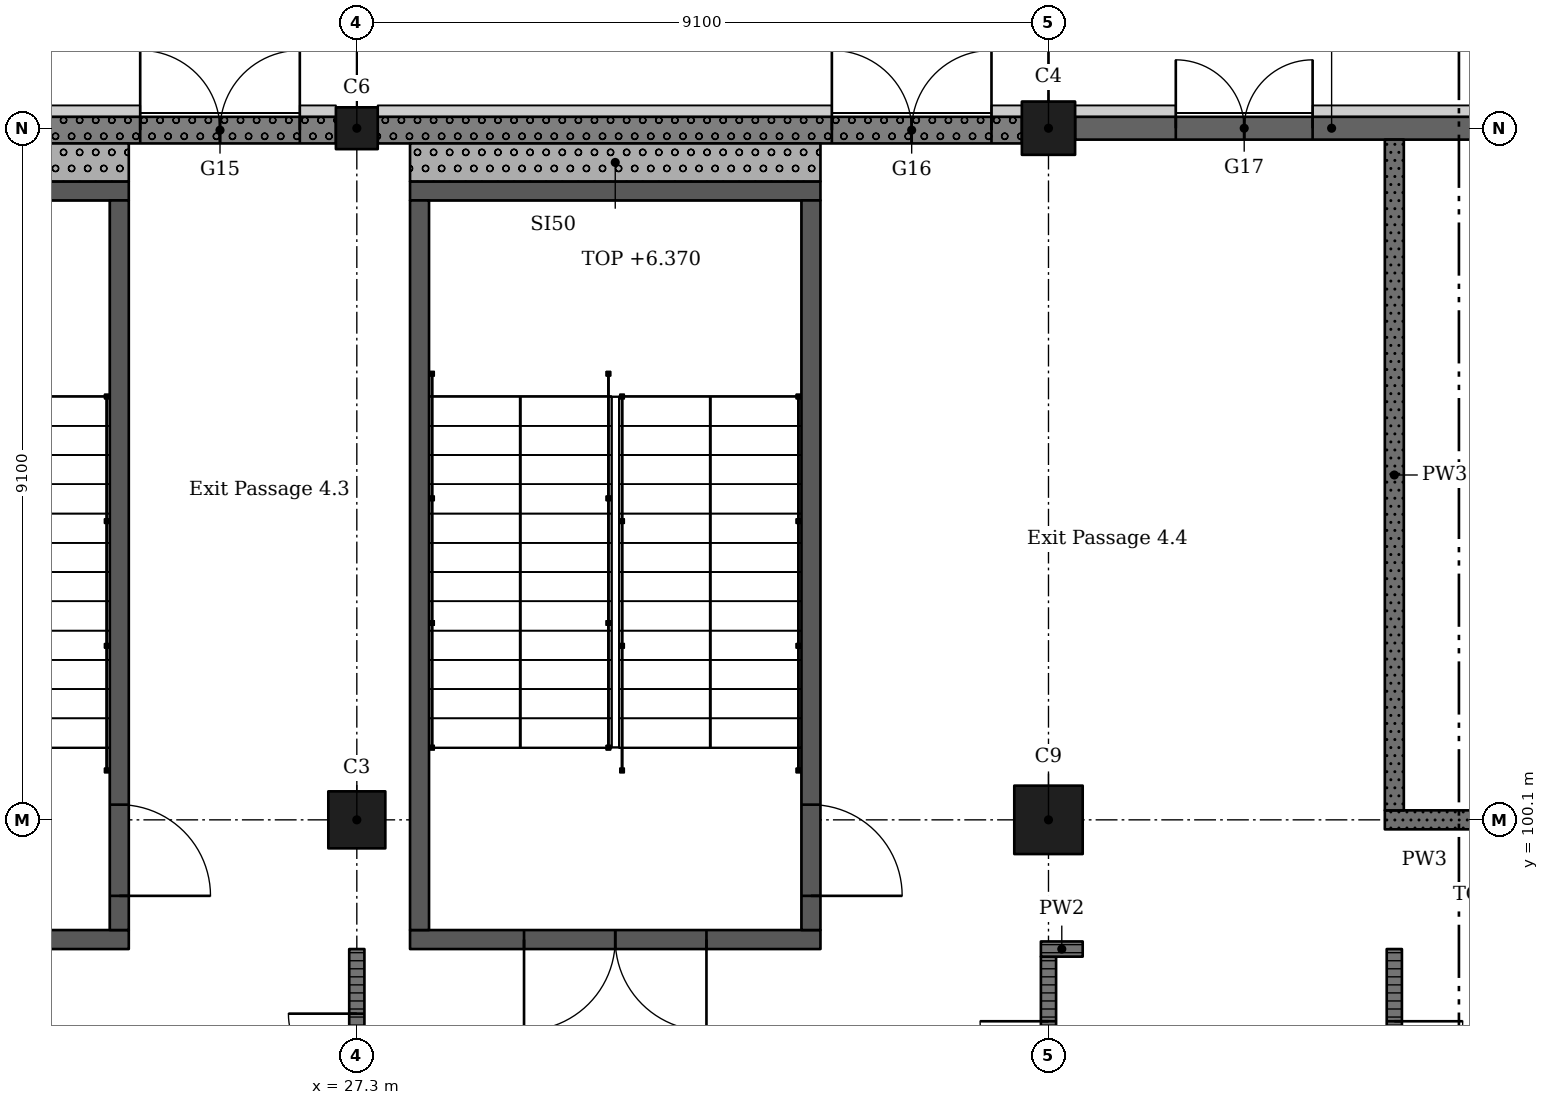
"""IFC4 building model, lengths in metres.
Left out: names, types, materials, properties, quantities, classifications, styles, units other than length and angle.
Written with IfcOpenShell. Run it as: python <this file> out.ifc"""

import sys

from ifc_helpers import new_model, si_unit, direction, frame, frame_2d, origin, origin_2d, place, context, subcontext, project, spatial, rectangle, extrude, element, fill, save


model = new_model("IFC4")
c1 = context("Model", 3, precision=1e-05, world=origin(), true_north=direction((0.0, 1.0)))
c2 = subcontext(c1, "Body", "Model", "MODEL_VIEW")
j1 = project(units=[si_unit("LENGTHUNIT", "METRE"), si_unit("PLANEANGLEUNIT", "RADIAN")], contexts=[c1])
p1 = place(None, origin())
s1 = spatial("IfcSite", under=j1, at=p1, CompositionType="ELEMENT")
p2 = place(p1, origin())
s2 = spatial("IfcBuilding", under=s1, at=p2, CompositionType="ELEMENT")
p3 = place(p2, origin())
s3 = spatial("IfcBuildingStorey", under=s2, at=p3, CompositionType="ELEMENT", Elevation=0.0)
p4 = place(p3, frame((27.3, 100.1, -0.4), z_axis=(0.0, 0.0, 1.0), x_axis=(1.0, 0.0, 0.0)))
e1 = element("IfcColumn", 1, at=p4, inside=s3, PredefinedType="COLUMN", context=c2, shape_type="SweptSolid", body=[
    extrude(rectangle(XDim=0.75, YDim=0.75, at=origin_2d()), origin(), (0.0, 0.0, 1.0), 6.77),
])
p5 = place(p3, frame((27.3, 109.2, -0.4), z_axis=(0.0, 0.0, 1.0), x_axis=(1.0, 0.0, 0.0)))
e2 = element("IfcColumn", 2, at=p5, inside=s3, PredefinedType="COLUMN", context=c2, shape_type="SweptSolid", body=[
    extrude(rectangle(XDim=0.55, YDim=0.55, at=origin_2d()), origin(), (0.0, 0.0, 1.0), 6.77),
])
p6 = place(p3, frame((36.4, 100.1, -0.4), z_axis=(0.0, 0.0, 1.0), x_axis=(1.0, 0.0, 0.0)))
e3 = element("IfcColumn", 3, at=p6, inside=s3, PredefinedType="COLUMN", context=c2, shape_type="SweptSolid", body=[
    extrude(rectangle(XDim=0.9, YDim=0.9, at=origin_2d()), origin(), (0.0, 0.0, 1.0), 6.77),
])
p7 = place(p3, frame((36.4, 109.2, -0.4), z_axis=(0.0, 0.0, 1.0), x_axis=(1.0, 0.0, 0.0)))
e4 = element("IfcColumn", 4, at=p7, inside=s3, PredefinedType="COLUMN", context=c2, shape_type="SweptSolid", body=[
    extrude(rectangle(XDim=0.7, YDim=0.7, at=origin_2d()), origin(), (0.0, 0.0, 1.0), 6.77),
])
p8 = place(p3, frame((24.3, 98.525, -0.4), z_axis=(0.0, 0.0, 1.0), x_axis=(-1.0, 0.0, 0.0)))
e5 = element("IfcWall", 5, at=p8, inside=s3, PredefinedType="SHEAR", context=c2, shape_type="SweptSolid", body=[
    extrude(rectangle(XDim=5.4, YDim=0.25, at=frame_2d((2.7, 0.0))), origin(), (0.0, 0.0, 1.0), 6.77),
])
p9 = place(p8, frame((1.5, 0.0, 0.4)))
e6 = element("IfcOpeningElement", 6, at=p9, cuts=e5, PredefinedType="OPENING", context=c2, shape_type="SweptSolid", body=[
    extrude(rectangle(XDim=2.4, YDim=2.1, at=frame_2d((1.2, 1.05))), frame((0.0, 0.135, 0.0), z_axis=(0.0, -1.0, 0.0), x_axis=(1.0, 0.0, 0.0)), (0.0, 0.0, 1.0), 0.27),
])
p10 = place(p3, frame((24.3, 108.375, -0.4), z_axis=(0.0, 0.0, 1.0), x_axis=(-1.0, 0.0, 0.0)))
e7 = element("IfcWall", 7, at=p10, inside=s3, PredefinedType="SHEAR", context=c2, shape_type="SweptSolid", body=[
    extrude(rectangle(XDim=5.4, YDim=0.25, at=frame_2d((2.7, 0.0))), origin(), (0.0, 0.0, 1.0), 6.77),
])
p11 = place(p3, frame((24.175, 108.25, -0.4), z_axis=(0.0, 0.0, 1.0), x_axis=(0.0, -1.0, 0.0)))
e8 = element("IfcWall", 8, at=p11, inside=s3, PredefinedType="SHEAR", context=c2, shape_type="SweptSolid", body=[
    extrude(rectangle(XDim=9.6, YDim=0.25, at=frame_2d((4.8, 0.0))), origin(), (0.0, 0.0, 1.0), 6.77),
])
p12 = place(p11, frame((7.95, 0.0, 0.4)))
e9 = element("IfcOpeningElement", 9, at=p12, cuts=e8, PredefinedType="OPENING", context=c2, shape_type="SweptSolid", body=[
    extrude(rectangle(XDim=1.2, YDim=2.1, at=frame_2d((0.6, 1.05))), frame((0.0, 0.135, 0.0), z_axis=(0.0, -1.0, 0.0), x_axis=(1.0, 0.0, 0.0)), (0.0, 0.0, 1.0), 0.27),
])
p13 = place(p3, frame((33.4, 98.525, -0.4), z_axis=(0.0, 0.0, 1.0), x_axis=(-1.0, 0.0, 0.0)))
e10 = element("IfcWall", 10, at=p13, inside=s3, PredefinedType="SHEAR", context=c2, shape_type="SweptSolid", body=[
    extrude(rectangle(XDim=5.4, YDim=0.25, at=frame_2d((2.7, 0.0))), origin(), (0.0, 0.0, 1.0), 6.77),
])
p14 = place(p13, frame((1.5, 0.0, 0.4)))
e11 = element("IfcOpeningElement", 11, at=p14, cuts=e10, PredefinedType="OPENING", context=c2, shape_type="SweptSolid", body=[
    extrude(rectangle(XDim=2.4, YDim=2.1, at=frame_2d((1.2, 1.05))), frame((0.0, 0.135, 0.0), z_axis=(0.0, -1.0, 0.0), x_axis=(1.0, 0.0, 0.0)), (0.0, 0.0, 1.0), 0.27),
])
p15 = place(p3, frame((33.4, 108.375, -0.4), z_axis=(0.0, 0.0, 1.0), x_axis=(-1.0, 0.0, 0.0)))
e12 = element("IfcWall", 12, at=p15, inside=s3, PredefinedType="SHEAR", context=c2, shape_type="SweptSolid", body=[
    extrude(rectangle(XDim=5.4, YDim=0.25, at=frame_2d((2.7, 0.0))), origin(), (0.0, 0.0, 1.0), 6.77),
])
p16 = place(p3, frame((28.125, 108.25, -0.4), z_axis=(0.0, 0.0, 1.0), x_axis=(0.0, -1.0, 0.0)))
e13 = element("IfcWall", 13, at=p16, inside=s3, PredefinedType="SHEAR", context=c2, shape_type="SweptSolid", body=[
    extrude(rectangle(XDim=9.6, YDim=0.25, at=frame_2d((4.8, 0.0))), origin(), (0.0, 0.0, 1.0), 6.77),
])
p17 = place(p3, frame((33.275, 108.25, -0.4), z_axis=(0.0, 0.0, 1.0), x_axis=(0.0, -1.0, 0.0)))
e14 = element("IfcWall", 14, at=p17, inside=s3, PredefinedType="SHEAR", context=c2, shape_type="SweptSolid", body=[
    extrude(rectangle(XDim=9.6, YDim=0.25, at=frame_2d((4.8, 0.0))), origin(), (0.0, 0.0, 1.0), 6.77),
])
p18 = place(p17, frame((7.95, 0.0, 0.4)))
e15 = element("IfcOpeningElement", 15, at=p18, cuts=e14, PredefinedType="OPENING", context=c2, shape_type="SweptSolid", body=[
    extrude(rectangle(XDim=1.2, YDim=2.1, at=frame_2d((0.6, 1.05))), frame((0.0, 0.135, 0.0), z_axis=(0.0, -1.0, 0.0), x_axis=(1.0, 0.0, 0.0)), (0.0, 0.0, 1.0), 0.27),
])
p19 = place(p3, frame((45.175, 109.2, 0.0), z_axis=(0.0, 0.0, 1.0), x_axis=(-1.0, 0.0, 0.0)))
e16 = element("IfcWall", 16, at=p19, inside=s3, PredefinedType="SOLIDWALL", context=c2, shape_type="SweptSolid", body=[
    extrude(rectangle(XDim=8.425, YDim=0.3, at=frame_2d((4.212, 0.0))), origin(), (0.0, 0.0, 1.0), 5.27),
])
p20 = place(p19, frame((5.3, 0.0, 0.0)))
e17 = element("IfcOpeningElement", 17, at=p20, cuts=e16, PredefinedType="OPENING", context=c2, shape_type="SweptSolid", body=[
    extrude(rectangle(XDim=1.8, YDim=2.4, at=frame_2d((0.9, 1.2))), frame((0.0, 0.16, 0.0), z_axis=(0.0, -1.0, 0.0), x_axis=(1.0, 0.0, 0.0)), (0.0, 0.0, 1.0), 0.32),
])
p21 = place(p19, frame((1.212, 0.0, 1.0)))
e18 = element("IfcOpeningElement", 18, at=p21, cuts=e16, PredefinedType="OPENING", context=c2, shape_type="SweptSolid", body=[
    extrude(rectangle(XDim=1.8, YDim=1.2, at=frame_2d((0.9, 0.6))), frame((0.0, 0.16, 0.0), z_axis=(0.0, -1.0, 0.0), x_axis=(1.0, 0.0, 0.0)), (0.0, 0.0, 1.0), 0.32),
])
p22 = place(p3, frame((36.05, 109.175, 0.0), z_axis=(0.0, 0.0, 1.0), x_axis=(-1.0, 0.0, 0.0)))
e19 = element("IfcWall", 19, at=p22, inside=s3, PredefinedType="SOLIDWALL", context=c2, shape_type="SweptSolid", body=[
    extrude(rectangle(XDim=8.475, YDim=0.35, at=frame_2d((4.238, 0.0))), origin(), (0.0, 0.0, 1.0), 5.27),
])
p23 = place(p22, frame((0.4, 0.0, 0.0)))
e20 = element("IfcOpeningElement", 20, at=p23, cuts=e19, PredefinedType="OPENING", context=c2, shape_type="SweptSolid", body=[
    extrude(rectangle(XDim=2.1, YDim=2.4, at=frame_2d((1.05, 1.2))), frame((0.0, 0.185, 0.0), z_axis=(0.0, -1.0, 0.0), x_axis=(1.0, 0.0, 0.0)), (0.0, 0.0, 1.0), 0.37),
])
p24 = place(p3, frame((27.025, 109.175, 0.0), z_axis=(0.0, 0.0, 1.0), x_axis=(-1.0, 0.0, 0.0)))
e21 = element("IfcWall", 21, at=p24, inside=s3, PredefinedType="SOLIDWALL", context=c2, shape_type="SweptSolid", body=[
    extrude(rectangle(XDim=8.55, YDim=0.35, at=frame_2d((4.275, 0.0))), origin(), (0.0, 0.0, 1.0), 5.27),
])
p25 = place(p24, frame((0.475, 0.0, 0.0)))
e22 = element("IfcOpeningElement", 22, at=p25, cuts=e21, PredefinedType="OPENING", context=c2, shape_type="SweptSolid", body=[
    extrude(rectangle(XDim=2.1, YDim=2.4, at=frame_2d((1.05, 1.2))), frame((0.0, 0.185, 0.0), z_axis=(0.0, -1.0, 0.0), x_axis=(1.0, 0.0, 0.0)), (0.0, 0.0, 1.0), 0.37),
])
p26 = place(p3, frame((18.9, 108.75, 0.0), z_axis=(0.0, 0.0, 1.0), x_axis=(1.0, 0.0, 0.0)))
e23 = element("IfcWall", 23, at=p26, inside=s3, PredefinedType="SOLIDWALL", context=c2, shape_type="SweptSolid", body=[
    extrude(rectangle(XDim=5.4, YDim=0.5, at=frame_2d((2.7, 0.0))), origin(), (0.0, 0.0, 1.0), 6.37),
])
p27 = place(p3, frame((28.0, 108.75, 0.0), z_axis=(0.0, 0.0, 1.0), x_axis=(1.0, 0.0, 0.0)))
e24 = element("IfcWall", 24, at=p27, inside=s3, PredefinedType="SOLIDWALL", context=c2, shape_type="SweptSolid", body=[
    extrude(rectangle(XDim=5.4, YDim=0.5, at=frame_2d((2.7, 0.0))), origin(), (0.0, 0.0, 1.0), 6.37),
])
p28 = place(p3, frame((27.3, 98.4, 0.0), z_axis=(0.0, 0.0, 1.0), x_axis=(0.0, -1.0, 0.0)))
e25 = element("IfcWall", 25, at=p28, inside=s3, PredefinedType="PARTITIONING", context=c2, shape_type="SweptSolid", body=[
    extrude(rectangle(XDim=6.925, YDim=0.2, at=frame_2d((3.462, 0.0))), origin(), (0.0, 0.0, 1.0), 5.32),
])
p29 = place(p28, frame((0.85, 0.0, 0.0)))
e26 = element("IfcOpeningElement", 26, at=p29, cuts=e25, PredefinedType="OPENING", context=c2, shape_type="SweptSolid", body=[
    extrude(rectangle(XDim=1.8, YDim=2.4, at=frame_2d((0.9, 1.2))), frame((0.0, 0.11, 0.0), z_axis=(0.0, -1.0, 0.0), x_axis=(1.0, 0.0, 0.0)), (0.0, 0.0, 1.0), 0.22),
])
p30 = place(p28, frame((4.25, 0.0, 0.0)))
e27 = element("IfcOpeningElement", 27, at=p30, cuts=e25, PredefinedType="OPENING", context=c2, shape_type="SweptSolid", body=[
    extrude(rectangle(XDim=1.8, YDim=2.4, at=frame_2d((0.9, 1.2))), frame((0.0, 0.11, 0.0), z_axis=(0.0, -1.0, 0.0), x_axis=(1.0, 0.0, 0.0)), (0.0, 0.0, 1.0), 0.22),
])
p31 = place(p3, frame((36.4, 98.3, 0.0), z_axis=(0.0, 0.0, 1.0), x_axis=(0.0, -1.0, 0.0)))
e28 = element("IfcWall", 28, at=p31, inside=s3, PredefinedType="PARTITIONING", context=c2, shape_type="SweptSolid", body=[
    extrude(rectangle(XDim=6.825, YDim=0.2, at=frame_2d((3.413, 0.0))), origin(), (0.0, 0.0, 1.0), 5.32),
])
p32 = place(p31, frame((0.85, 0.0, 0.0)))
e29 = element("IfcOpeningElement", 29, at=p32, cuts=e28, PredefinedType="OPENING", context=c2, shape_type="SweptSolid", body=[
    extrude(rectangle(XDim=1.8, YDim=2.4, at=frame_2d((0.9, 1.2))), frame((0.0, 0.11, 0.0), z_axis=(0.0, -1.0, 0.0), x_axis=(1.0, 0.0, 0.0)), (0.0, 0.0, 1.0), 0.22),
])
p33 = place(p31, frame((4.25, 0.0, 0.0)))
e30 = element("IfcOpeningElement", 30, at=p33, cuts=e28, PredefinedType="OPENING", context=c2, shape_type="SweptSolid", body=[
    extrude(rectangle(XDim=1.8, YDim=2.4, at=frame_2d((0.9, 1.2))), frame((0.0, 0.11, 0.0), z_axis=(0.0, -1.0, 0.0), x_axis=(1.0, 0.0, 0.0)), (0.0, 0.0, 1.0), 0.22),
])
p34 = place(p3, frame((36.85, 98.4, 0.0), z_axis=(0.0, 0.0, 1.0), x_axis=(-1.0, 0.0, 0.0)))
e31 = element("IfcWall", 31, at=p34, inside=s3, PredefinedType="PARTITIONING", context=c2, shape_type="SweptSolid", body=[
    extrude(rectangle(XDim=0.55, YDim=0.2, at=frame_2d((0.275, 0.0))), origin(), (0.0, 0.0, 1.0), 6.02),
])
p35 = place(p3, frame((40.825, 100.1, 0.0), z_axis=(0.0, 0.0, 1.0), x_axis=(1.0, 0.0, 0.0)))
e32 = element("IfcWall", 32, at=p35, inside=s3, PredefinedType="SOLIDWALL", context=c2, shape_type="SweptSolid", body=[
    extrude(rectangle(XDim=4.125, YDim=0.25, at=frame_2d((2.062, 0.0))), origin(), (0.0, 0.0, 1.0), 5.32),
])
p36 = place(p3, frame((40.95, 98.4, 0.0), z_axis=(0.0, 0.0, 1.0), x_axis=(0.0, -1.0, 0.0)))
e33 = element("IfcWall", 33, at=p36, inside=s3, PredefinedType="PARTITIONING", context=c2, shape_type="SweptSolid", body=[
    extrude(rectangle(XDim=7.3, YDim=0.2, at=frame_2d((3.65, 0.0))), origin(), (0.0, 0.0, 1.0), 6.02),
])
p37 = place(p36, frame((0.95, 0.0, 0.0)))
e34 = element("IfcOpeningElement", 34, at=p37, cuts=e33, PredefinedType="OPENING", context=c2, shape_type="SweptSolid", body=[
    extrude(rectangle(XDim=1.8, YDim=2.4, at=frame_2d((0.9, 1.2))), frame((0.0, 0.11, 0.0), z_axis=(0.0, -1.0, 0.0), x_axis=(1.0, 0.0, 0.0)), (0.0, 0.0, 1.0), 0.22),
])
p38 = place(p36, frame((4.55, 0.0, 0.0)))
e35 = element("IfcOpeningElement", 35, at=p38, cuts=e33, PredefinedType="OPENING", context=c2, shape_type="SweptSolid", body=[
    extrude(rectangle(XDim=1.8, YDim=2.4, at=frame_2d((0.9, 1.2))), frame((0.0, 0.11, 0.0), z_axis=(0.0, -1.0, 0.0), x_axis=(1.0, 0.0, 0.0)), (0.0, 0.0, 1.0), 0.22),
])
p39 = place(p3, frame((40.95, 109.05, 0.0), z_axis=(0.0, 0.0, 1.0), x_axis=(0.0, -1.0, 0.0)))
e36 = element("IfcWall", 36, at=p39, inside=s3, PredefinedType="SOLIDWALL", context=c2, shape_type="SweptSolid", body=[
    extrude(rectangle(XDim=8.825, YDim=0.25, at=frame_2d((4.413, 0.0))), origin(), (0.0, 0.0, 1.0), 6.02),
])
p40 = place(p20, frame((1.8, 0.0, 0.0), z_axis=(0.0, 0.0, 1.0), x_axis=(-1.0, 0.0, 0.0)))
e37 = element("IfcDoor", 37, at=p40, inside=s3, OperationType="DOUBLE_DOOR_SINGLE_SWING", PredefinedType="DOOR", context=c2, shape_type="SweptSolid", body=[
    extrude(rectangle(XDim=1.8, YDim=2.4, at=frame_2d((0.9, 1.2))), frame((0.0, 0.025, 0.0), z_axis=(0.0, -1.0, 0.0), x_axis=(1.0, 0.0, 0.0)), (0.0, 0.0, 1.0), 0.05),
])
fill(e17, e37)
p41 = place(p23, frame((2.1, 0.0, 0.0), z_axis=(0.0, 0.0, 1.0), x_axis=(-1.0, 0.0, 0.0)))
e38 = element("IfcDoor", 38, at=p41, inside=s3, OperationType="DOUBLE_DOOR_SINGLE_SWING", PredefinedType="DOOR", context=c2, shape_type="SweptSolid", body=[
    extrude(rectangle(XDim=2.1, YDim=2.4, at=frame_2d((1.05, 1.2))), frame((0.0, 0.025, 0.0), z_axis=(0.0, -1.0, 0.0), x_axis=(1.0, 0.0, 0.0)), (0.0, 0.0, 1.0), 0.05),
])
fill(e20, e38)
p42 = place(p25, frame((2.1, 0.0, 0.0), z_axis=(0.0, 0.0, 1.0), x_axis=(-1.0, 0.0, 0.0)))
e39 = element("IfcDoor", 39, at=p42, inside=s3, OperationType="DOUBLE_DOOR_SINGLE_SWING", PredefinedType="DOOR", context=c2, shape_type="SweptSolid", body=[
    extrude(rectangle(XDim=2.1, YDim=2.4, at=frame_2d((1.05, 1.2))), frame((0.0, 0.025, 0.0), z_axis=(0.0, -1.0, 0.0), x_axis=(1.0, 0.0, 0.0)), (0.0, 0.0, 1.0), 0.05),
])
fill(e22, e39)
p43 = place(p29, origin())
e40 = element("IfcDoor", 40, at=p43, inside=s3, OperationType="DOUBLE_DOOR_SINGLE_SWING", PredefinedType="DOOR", context=c2, shape_type="SweptSolid", body=[
    extrude(rectangle(XDim=1.8, YDim=2.4, at=frame_2d((0.9, 1.2))), frame((0.0, 0.025, 0.0), z_axis=(0.0, -1.0, 0.0), x_axis=(1.0, 0.0, 0.0)), (0.0, 0.0, 1.0), 0.05),
])
fill(e26, e40)
p44 = place(p32, origin())
e41 = element("IfcDoor", 41, at=p44, inside=s3, OperationType="DOUBLE_DOOR_SINGLE_SWING", PredefinedType="DOOR", context=c2, shape_type="SweptSolid", body=[
    extrude(rectangle(XDim=1.8, YDim=2.4, at=frame_2d((0.9, 1.2))), frame((0.0, 0.025, 0.0), z_axis=(0.0, -1.0, 0.0), x_axis=(1.0, 0.0, 0.0)), (0.0, 0.0, 1.0), 0.05),
])
fill(e29, e41)
p45 = place(p37, origin())
e42 = element("IfcDoor", 42, at=p45, inside=s3, OperationType="DOUBLE_DOOR_SINGLE_SWING", PredefinedType="DOOR", context=c2, shape_type="SweptSolid", body=[
    extrude(rectangle(XDim=1.8, YDim=2.4, at=frame_2d((0.9, 1.2))), frame((0.0, 0.025, 0.0), z_axis=(0.0, -1.0, 0.0), x_axis=(1.0, 0.0, 0.0)), (0.0, 0.0, 1.0), 0.05),
])
fill(e34, e42)
p46 = place(p14, origin())
e43 = element("IfcDoor", 43, at=p46, inside=s3, OperationType="DOUBLE_DOOR_SINGLE_SWING", PredefinedType="DOOR", context=c2, shape_type="SweptSolid", body=[
    extrude(rectangle(XDim=2.4, YDim=2.1, at=frame_2d((1.2, 1.05))), frame((0.0, 0.025, 0.0), z_axis=(0.0, -1.0, 0.0), x_axis=(1.0, 0.0, 0.0)), (0.0, 0.0, 1.0), 0.05),
])
fill(e11, e43)
p47 = place(p12, origin())
e44 = element("IfcDoor", 44, at=p47, inside=s3, OperationType="SINGLE_SWING_LEFT", PredefinedType="DOOR", context=c2, shape_type="SweptSolid", body=[
    extrude(rectangle(XDim=1.2, YDim=2.1, at=frame_2d((0.6, 1.05))), frame((0.0, 0.025, 0.0), z_axis=(0.0, -1.0, 0.0), x_axis=(1.0, 0.0, 0.0)), (0.0, 0.0, 1.0), 0.05),
])
fill(e9, e44)
p48 = place(p18, origin())
e45 = element("IfcDoor", 45, at=p48, inside=s3, OperationType="SINGLE_SWING_LEFT", PredefinedType="DOOR", context=c2, shape_type="SweptSolid", body=[
    extrude(rectangle(XDim=1.2, YDim=2.1, at=frame_2d((0.6, 1.05))), frame((0.0, 0.025, 0.0), z_axis=(0.0, -1.0, 0.0), x_axis=(1.0, 0.0, 0.0)), (0.0, 0.0, 1.0), 0.05),
])
fill(e15, e45)
save(model, sys.argv[1])
